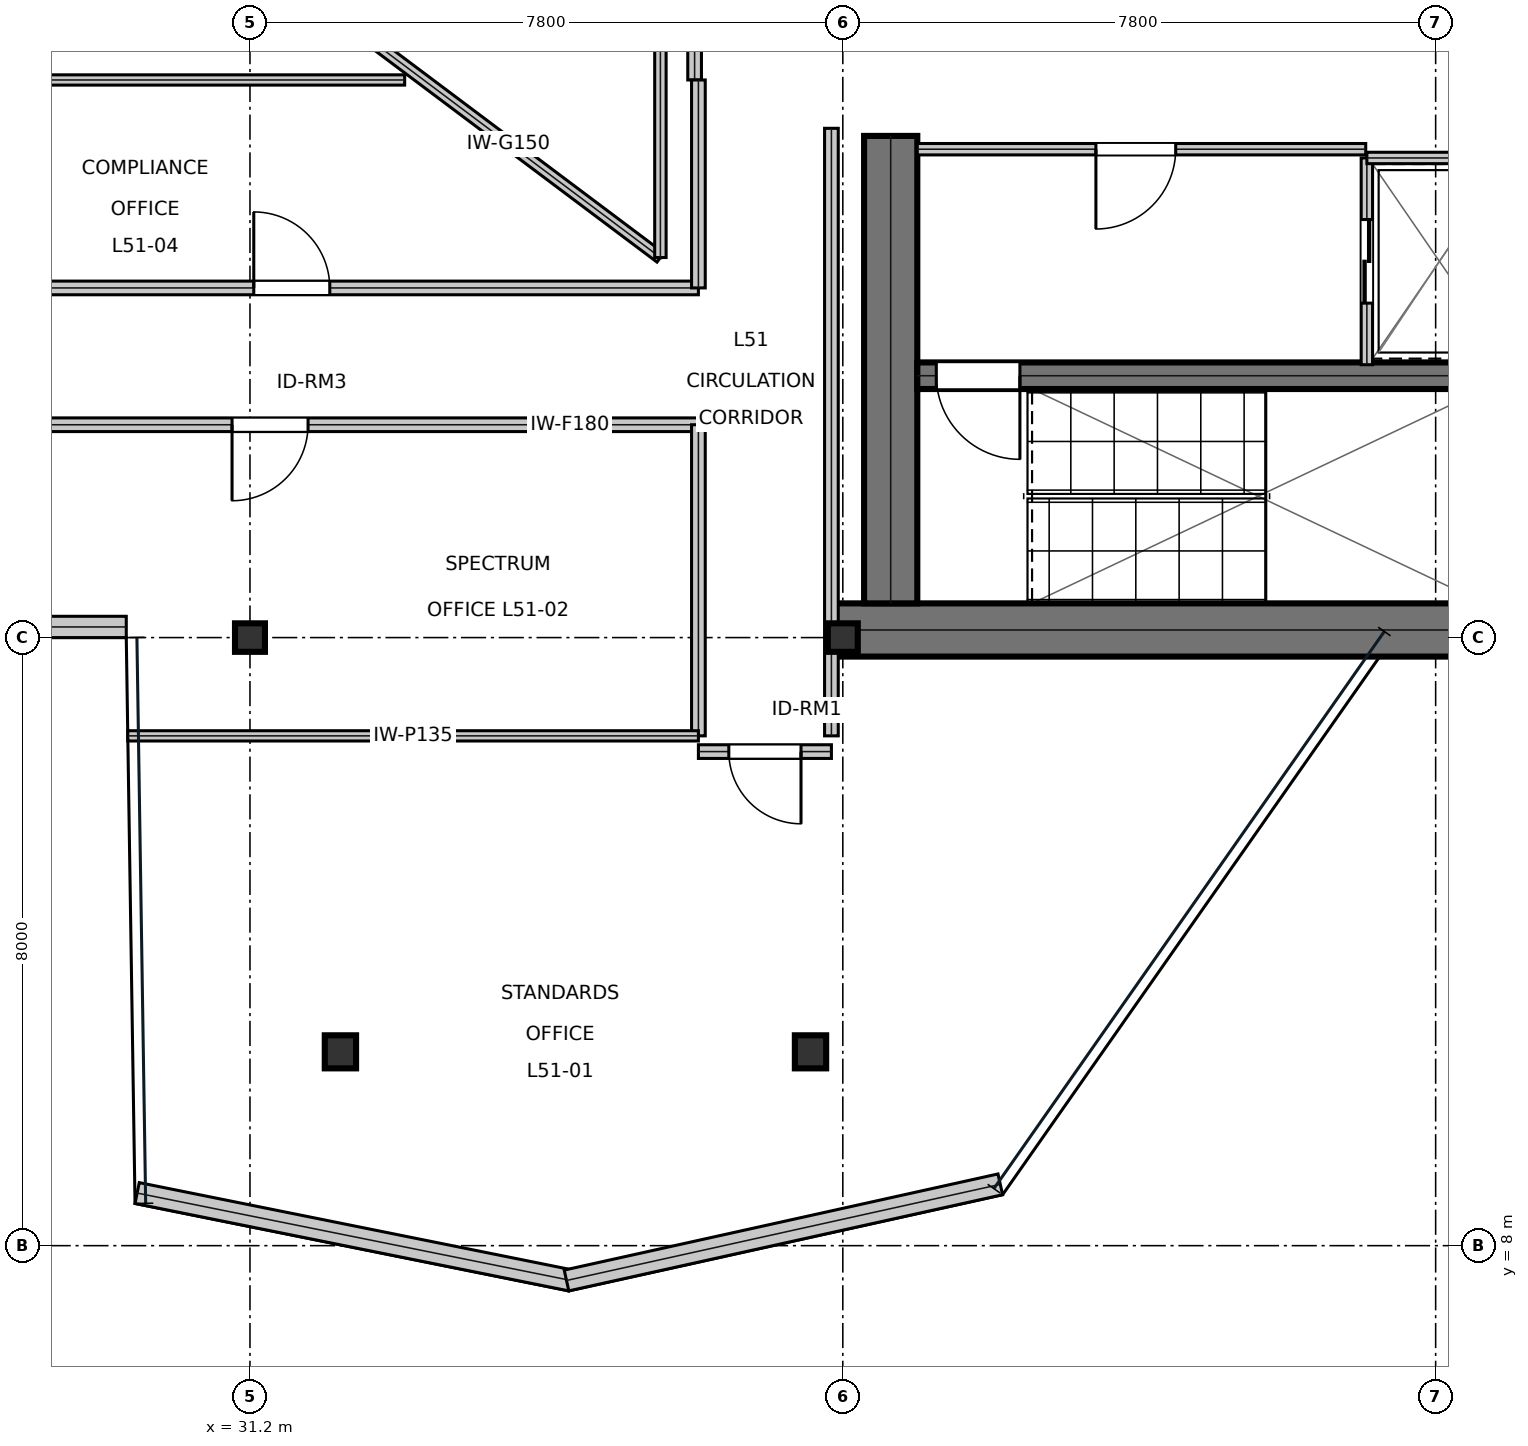
"""IFC4 building model, lengths in metres.
Left out: names, types, materials, properties, quantities, classifications, styles, units other than length and angle.
Written with IfcOpenShell. Run it as: python <this file> out.ifc"""

import sys

from ifc_helpers import new_model, si_unit, direction, frame, frame_2d, origin, origin_2d, place, context, subcontext, project, spatial, rectangle, i_section, extrude, element, fill, save


model = new_model("IFC4")
c1 = context("Model", 3, precision=1e-05, world=origin(), true_north=direction((0.0, 1.0)))
c2 = subcontext(c1, "Body", "Model", "MODEL_VIEW")
j1 = project(units=[si_unit("LENGTHUNIT", "METRE"), si_unit("PLANEANGLEUNIT", "RADIAN")], contexts=[c1])
p1 = place(None, origin())
s1 = spatial("IfcSite", under=j1, at=p1, CompositionType="ELEMENT")
p2 = place(p1, origin())
s2 = spatial("IfcBuilding", under=s1, at=p2, CompositionType="ELEMENT")
p3 = place(p2, frame((0.0, 0.0, 220.2)))
s3 = spatial("IfcBuildingStorey", under=s2, at=p3, CompositionType="ELEMENT", Elevation=220.2)
p4 = place(p3, frame((38.8, 16.1, 0.0), z_axis=(0.0, 0.0, 1.0), x_axis=(1.0, 0.0, 0.0)))
e1 = element("IfcWall", 1, at=p4, inside=s3, PredefinedType="SHEAR", context=c2, shape_type="SweptSolid", body=[
    extrude(rectangle(XDim=16.0, YDim=0.7, at=frame_2d((8.0, 0.0))), origin(), (0.0, 0.0, 1.0), 3.79),
])
p5 = place(p3, frame((39.63, 16.45, 0.0), z_axis=(0.0, 0.0, 1.0), x_axis=(0.0, 1.0, 0.0)))
e2 = element("IfcWall", 2, at=p5, inside=s3, PredefinedType="SHEAR", context=c2, shape_type="SweptSolid", body=[
    extrude(rectangle(XDim=6.15, YDim=0.7, at=frame_2d((3.075, 0.0))), origin(), (0.0, 0.0, 1.0), 3.79),
])
p6 = place(p3, frame((39.98, 19.445, 0.0), z_axis=(0.0, 0.0, 1.0), x_axis=(1.0, 0.0, 0.0)))
e3 = element("IfcWall", 3, at=p6, inside=s3, PredefinedType="SHEAR", context=c2, shape_type="SweptSolid", body=[
    extrude(rectangle(XDim=7.71, YDim=0.35, at=frame_2d((3.855, 0.0))), origin(), (0.0, 0.0, 1.0), 3.79),
])
p7 = place(p6, frame((0.25, 0.0, 0.0)))
e4 = element("IfcOpeningElement", 4, at=p7, cuts=e3, PredefinedType="OPENING", context=c2, shape_type="SweptSolid", body=[
    extrude(rectangle(XDim=1.1, YDim=2.15, at=frame_2d((0.55, 1.075))), frame((0.0, 0.185, 0.0), z_axis=(0.0, -1.0, 0.0), x_axis=(1.0, 0.0, 0.0)), (0.0, 0.0, 1.0), 0.37),
])
for number, where, z_axis, x_axis in (
    (5, (31.2, 16.0, 0.0), (0.0, 0.0, 1.0), (1.0, 0.0, 0.0)),
    (6, (39.0, 16.0, 0.0), (0.0, 0.0, 1.0), (1.0, 0.0, 0.0)),
):
    element("IfcColumn", number, at=place(p3, frame(where, z_axis=z_axis, x_axis=x_axis)), inside=s3, PredefinedType="COLUMN", context=c2, shape_type="SweptSolid", body=[
        extrude(i_section(OverallWidth=0.394, OverallDepth=0.375, WebThickness=0.017, FlangeThickness=0.028, at=origin_2d()), origin(), (0.0, 0.0, 1.0), 4.044),
    ])
for number, where, z_axis, x_axis in (
    (7, (32.39, 10.55, 0.016), (0.0, 0.0, 1.0), (1.0, 0.0, 0.0)),
    (8, (38.575, 10.55, 0.016), (0.0, 0.0, 1.0), (1.0, 0.0, 0.0)),
):
    element("IfcColumn", number, at=place(p3, frame(where, z_axis=z_axis, x_axis=x_axis)), inside=s3, PredefinedType="COLUMN", context=c2, shape_type="SweptSolid", body=[
        extrude(i_section(OverallWidth=0.412, OverallDepth=0.435, WebThickness=0.036, FlangeThickness=0.058, at=origin_2d()), origin(), (0.0, 0.0, 1.0), 4.018),
    ])
p8 = place(p3, frame((26.76, 16.14, 0.0), z_axis=(0.0, 0.0, 1.0), x_axis=(1.0, 0.0, 0.0)))
e9 = element("IfcWall", 9, at=p8, inside=s3, PredefinedType="STANDARD", context=c2, shape_type="SweptSolid", body=[
    extrude(rectangle(XDim=2.812, YDim=0.28, at=frame_2d((1.406, 0.0))), origin(), (0.0, 0.0, 1.0), 3.79),
])
p9 = place(p3, frame((29.715, 8.692, 0.0), z_axis=(0.0, 0.0, 1.0), x_axis=(0.98030065813, -0.197511062146, 0.0)))
e10 = element("IfcWall", 10, at=p9, inside=s3, PredefinedType="STANDARD", context=c2, shape_type="SweptSolid", body=[
    extrude(rectangle(XDim=5.822, YDim=0.28, at=frame_2d((2.911, 0.0))), origin(), (0.0, 0.0, 1.0), 3.79),
])
p10 = place(p3, frame((35.365, 7.542, 0.0), z_axis=(0.0, 0.0, 1.0), x_axis=(0.976309738065, 0.216377668346, 0.0)))
e11 = element("IfcWall", 11, at=p10, inside=s3, PredefinedType="STANDARD", context=c2, shape_type="SweptSolid", body=[
    extrude(rectangle(XDim=5.846, YDim=0.28, at=frame_2d((2.923, 0.0))), origin(), (0.0, 0.0, 1.0), 3.79),
])
p11 = place(p3, frame((39.98, 22.425, 0.0), z_axis=(0.0, 0.0, 1.0), x_axis=(1.0, 0.0, 0.0)))
e12 = element("IfcWall", 12, at=p11, inside=s3, PredefinedType="PARTITIONING", context=c2, shape_type="SweptSolid", body=[
    extrude(rectangle(XDim=5.9, YDim=0.15, at=frame_2d((2.95, 0.0))), origin(), (0.0, 0.0, 1.0), 3.79),
])
p12 = place(p11, frame((2.35, 0.0, 0.0)))
e13 = element("IfcOpeningElement", 13, at=p12, cuts=e12, PredefinedType="OPENING", context=c2, shape_type="SweptSolid", body=[
    extrude(rectangle(XDim=1.05, YDim=2.15, at=frame_2d((0.525, 1.075))), frame((0.0, 0.085, 0.0), z_axis=(0.0, -1.0, 0.0), x_axis=(1.0, 0.0, 0.0)), (0.0, 0.0, 1.0), 0.17),
])
p13 = place(p3, frame((45.895, 19.59, 0.0), z_axis=(0.0, 0.0, 1.0), x_axis=(0.0, 1.0, 0.0)))
e14 = element("IfcWall", 14, at=p13, inside=s3, PredefinedType="PARTITIONING", context=c2, shape_type="SweptSolid", body=[
    extrude(rectangle(XDim=2.72, YDim=0.15, at=frame_2d((1.36, 0.0))), origin(), (0.0, 0.0, 1.0), 3.79),
])
p14 = place(p13, frame((0.81, 0.0, 0.0)))
e15 = element("IfcOpeningElement", 15, at=p14, cuts=e14, PredefinedType="OPENING", context=c2, shape_type="SweptSolid", body=[
    extrude(rectangle(XDim=1.1, YDim=2.15, at=frame_2d((0.55, 1.075))), frame((0.0, 0.085, 0.0), z_axis=(0.0, -1.0, 0.0), x_axis=(1.0, 0.0, 0.0)), (0.0, 0.0, 1.0), 0.17),
])
p15 = place(p3, frame((45.895, 22.31, 0.0), z_axis=(0.0, 0.0, 1.0), x_axis=(1.0, 0.0, 0.0)))
e16 = element("IfcWall", 16, at=p15, inside=s3, PredefinedType="PARTITIONING", context=c2, shape_type="SweptSolid", body=[
    extrude(rectangle(XDim=1.915, YDim=0.15, at=frame_2d((0.958, 0.0))), origin(), (0.0, 0.0, 1.0), 3.79),
])
p16 = place(p3, frame((37.1, 14.5, 0.0), z_axis=(0.0, 0.0, 1.0), x_axis=(1.0, 0.0, 0.0)))
e17 = element("IfcWall", 17, at=p16, inside=s3, PredefinedType="SOLIDWALL", context=c2, shape_type="SweptSolid", body=[
    extrude(rectangle(XDim=1.75, YDim=0.18, at=frame_2d((0.875, 0.0))), origin(), (0.0, 0.0, 1.0), 3.241),
])
p17 = place(p16, frame((0.4, 0.0, 0.0)))
e18 = element("IfcOpeningElement", 18, at=p17, cuts=e17, PredefinedType="OPENING", context=c2, shape_type="SweptSolid", body=[
    extrude(rectangle(XDim=0.95, YDim=2.15, at=frame_2d((0.475, 1.075))), frame((0.0, 0.1, 0.0), z_axis=(0.0, -1.0, 0.0), x_axis=(1.0, 0.0, 0.0)), (0.0, 0.0, 1.0), 0.2),
])
p18 = place(p3, frame((25.828, 18.8, 0.0), z_axis=(0.0, 0.0, 1.0), x_axis=(1.0, 0.0, 0.0)))
e19 = element("IfcWall", 19, at=p18, inside=s3, PredefinedType="SOLIDWALL", context=c2, shape_type="SweptSolid", body=[
    extrude(rectangle(XDim=11.272, YDim=0.18, at=frame_2d((5.636, 0.0))), origin(), (0.0, 0.0, 1.0), 3.241),
])
p19 = place(p18, frame((5.136, 0.0, 0.0)))
e20 = element("IfcOpeningElement", 20, at=p19, cuts=e19, PredefinedType="OPENING", context=c2, shape_type="SweptSolid", body=[
    extrude(rectangle(XDim=1.0, YDim=2.15, at=frame_2d((0.5, 1.075))), frame((0.0, 0.1, 0.0), z_axis=(0.0, -1.0, 0.0), x_axis=(1.0, 0.0, 0.0)), (0.0, 0.0, 1.0), 0.2),
])
p20 = place(p3, frame((26.4, 20.6, 0.0), z_axis=(0.0, 0.0, 1.0), x_axis=(1.0, 0.0, 0.0)))
e21 = element("IfcWall", 21, at=p20, inside=s3, PredefinedType="SOLIDWALL", context=c2, shape_type="SweptSolid", body=[
    extrude(rectangle(XDim=10.7, YDim=0.18, at=frame_2d((5.35, 0.0))), origin(), (0.0, 0.0, 1.0), 3.241),
])
p21 = place(p20, frame((4.85, 0.0, 0.0)))
e22 = element("IfcOpeningElement", 22, at=p21, cuts=e21, PredefinedType="OPENING", context=c2, shape_type="SweptSolid", body=[
    extrude(rectangle(XDim=1.0, YDim=2.15, at=frame_2d((0.5, 1.075))), frame((0.0, 0.1, 0.0), z_axis=(0.0, -1.0, 0.0), x_axis=(1.0, 0.0, 0.0)), (0.0, 0.0, 1.0), 0.2),
])
p22 = place(p3, frame((37.05, 23.336, 0.0), z_axis=(0.0, 0.0, 1.0), x_axis=(0.0, 1.0, 0.0)))
e23 = element("IfcWall", 23, at=p22, inside=s3, PredefinedType="SOLIDWALL", context=c2, shape_type="SweptSolid", body=[
    extrude(rectangle(XDim=10.164, YDim=0.18, at=frame_2d((5.082, 0.0))), origin(), (0.0, 0.0, 1.0), 3.241),
])
p23 = place(p22, frame((4.582, 0.0, 0.0)))
e24 = element("IfcOpeningElement", 24, at=p23, cuts=e23, PredefinedType="OPENING", context=c2, shape_type="SweptSolid", body=[
    extrude(rectangle(XDim=1.0, YDim=2.15, at=frame_2d((0.5, 1.075))), frame((0.0, 0.1, 0.0), z_axis=(0.0, -1.0, 0.0), x_axis=(1.0, 0.0, 0.0)), (0.0, 0.0, 1.0), 0.2),
])
p24 = place(p3, frame((38.85, 14.707, 0.0), z_axis=(0.0, 0.0, 1.0), x_axis=(0.0, 1.0, 0.0)))
e25 = element("IfcWall", 25, at=p24, inside=s3, PredefinedType="SOLIDWALL", context=c2, shape_type="SweptSolid", body=[
    extrude(rectangle(XDim=7.993, YDim=0.18, at=frame_2d((3.997, 0.0))), origin(), (0.0, 0.0, 1.0), 3.241),
])
p25 = place(p3, frame((37.1, 14.707, 0.0), z_axis=(0.0, 0.0, 1.0), x_axis=(0.0, 1.0, 0.0)))
e26 = element("IfcWall", 26, at=p25, inside=s3, PredefinedType="SOLIDWALL", context=c2, shape_type="SweptSolid", body=[
    extrude(rectangle(XDim=4.093, YDim=0.18, at=frame_2d((2.046, 0.0))), origin(), (0.0, 0.0, 1.0), 3.241),
])
p26 = place(p3, frame((37.1, 20.6, 0.0), z_axis=(0.0, 0.0, 1.0), x_axis=(0.0, 1.0, 0.0)))
e27 = element("IfcWall", 27, at=p26, inside=s3, PredefinedType="SOLIDWALL", context=c2, shape_type="SweptSolid", body=[
    extrude(rectangle(XDim=2.736, YDim=0.18, at=frame_2d((1.368, 0.0))), origin(), (0.0, 0.0, 1.0), 3.79),
])
p27 = place(p3, frame((29.592, 14.707, 0.0), z_axis=(0.0, 0.0, 1.0), x_axis=(1.0, 0.0, 0.0)))
e28 = element("IfcWall", 28, at=p27, inside=s3, PredefinedType="PARTITIONING", context=c2, shape_type="SweptSolid", body=[
    extrude(rectangle(XDim=7.508, YDim=0.135, at=frame_2d((3.754, 0.0))), origin(), (0.0, 0.0, 1.0), 3.319),
])
p28 = place(p3, frame((26.4, 23.336, 0.0), z_axis=(0.0, 0.0, 1.0), x_axis=(1.0, 0.0, 0.0)))
e29 = element("IfcWall", 29, at=p28, inside=s3, PredefinedType="PARTITIONING", context=c2, shape_type="SweptSolid", body=[
    extrude(rectangle(XDim=6.835, YDim=0.135, at=frame_2d((3.418, 0.0))), origin(), (0.0, 0.0, 1.0), 3.241),
])
p29 = place(p3, frame((32.6, 24.0, 0.0), z_axis=(0.0, 0.0, 1.0), x_axis=(0.8, -0.6, 0.0)))
e30 = element("IfcWall", 30, at=p29, inside=s3, PredefinedType="MOVABLE", context=c2, shape_type="SweptSolid", body=[
    extrude(rectangle(XDim=5.0, YDim=0.15, at=frame_2d((2.5, 0.0))), origin(), (0.0, 0.0, 1.0), 3.79),
])
p30 = place(p3, frame((36.6, 21.0, 0.0), z_axis=(0.0, 0.0, 1.0), x_axis=(0.0, 1.0, 0.0)))
e31 = element("IfcWall", 31, at=p30, inside=s3, PredefinedType="MOVABLE", context=c2, shape_type="SweptSolid", body=[
    extrude(rectangle(XDim=6.0, YDim=0.15, at=frame_2d((3.0, 0.0))), origin(), (0.0, 0.0, 1.0), 3.79),
])
p31 = place(p12, frame((1.05, 0.0, 0.0), z_axis=(0.0, 0.0, 1.0), x_axis=(-1.0, 0.0, 0.0)))
e32 = element("IfcDoor", 32, at=p31, inside=s3, OperationType="SINGLE_SWING_RIGHT", PredefinedType="DOOR", context=c2, shape_type="SweptSolid", body=[
    extrude(rectangle(XDim=1.05, YDim=2.15, at=frame_2d((0.525, 1.075))), frame((0.0, 0.025, 0.0), z_axis=(0.0, -1.0, 0.0), x_axis=(1.0, 0.0, 0.0)), (0.0, 0.0, 1.0), 0.05),
])
fill(e13, e32)
p32 = place(p14, frame((1.1, 0.0, 0.0), z_axis=(0.0, 0.0, 1.0), x_axis=(-1.0, 0.0, 0.0)))
e33 = element("IfcDoor", 33, at=p32, inside=s3, OperationType="DOUBLE_DOOR_SLIDING", PredefinedType="DOOR", context=c2, shape_type="SweptSolid", body=[
    extrude(rectangle(XDim=1.1, YDim=2.15, at=frame_2d((0.55, 1.075))), frame((0.0, 0.025, 0.0), z_axis=(0.0, -1.0, 0.0), x_axis=(1.0, 0.0, 0.0)), (0.0, 0.0, 1.0), 0.05),
])
fill(e15, e33)
p33 = place(p17, frame((0.95, 0.0, 0.0), z_axis=(0.0, 0.0, 1.0), x_axis=(-1.0, 0.0, 0.0)))
e34 = element("IfcDoor", 34, at=p33, inside=s3, OperationType="SINGLE_SWING_LEFT", PredefinedType="DOOR", context=c2, shape_type="SweptSolid", body=[
    extrude(rectangle(XDim=0.95, YDim=2.15, at=frame_2d((0.475, 1.075))), frame((0.0, 0.025, 0.0), z_axis=(0.0, -1.0, 0.0), x_axis=(1.0, 0.0, 0.0)), (0.0, 0.0, 1.0), 0.05),
])
fill(e18, e34)
p34 = place(p19, frame((1.0, 0.0, 0.0), z_axis=(0.0, 0.0, 1.0), x_axis=(-1.0, 0.0, 0.0)))
e35 = element("IfcDoor", 35, at=p34, inside=s3, OperationType="SINGLE_SWING_RIGHT", PredefinedType="DOOR", context=c2, shape_type="SweptSolid", body=[
    extrude(rectangle(XDim=1.0, YDim=2.15, at=frame_2d((0.5, 1.075))), frame((0.0, 0.025, 0.0), z_axis=(0.0, -1.0, 0.0), x_axis=(1.0, 0.0, 0.0)), (0.0, 0.0, 1.0), 0.05),
])
fill(e20, e35)
p35 = place(p21, origin())
e36 = element("IfcDoor", 36, at=p35, inside=s3, OperationType="SINGLE_SWING_LEFT", PredefinedType="DOOR", context=c2, shape_type="SweptSolid", body=[
    extrude(rectangle(XDim=1.0, YDim=2.15, at=frame_2d((0.5, 1.075))), frame((0.0, 0.025, 0.0), z_axis=(0.0, -1.0, 0.0), x_axis=(1.0, 0.0, 0.0)), (0.0, 0.0, 1.0), 0.05),
])
fill(e22, e36)
p36 = place(p7, frame((1.1, 0.0, 0.0), z_axis=(0.0, 0.0, 1.0), x_axis=(-1.0, 0.0, 0.0)))
e37 = element("IfcDoor", 37, at=p36, inside=s3, OperationType="SINGLE_SWING_LEFT", PredefinedType="DOOR", context=c2, shape_type="SweptSolid", body=[
    extrude(rectangle(XDim=1.1, YDim=2.15, at=frame_2d((0.55, 1.075))), frame((0.0, 0.025, 0.0), z_axis=(0.0, -1.0, 0.0), x_axis=(1.0, 0.0, 0.0)), (0.0, 0.0, 1.0), 0.05),
])
fill(e4, e37)
save(model, sys.argv[1])
